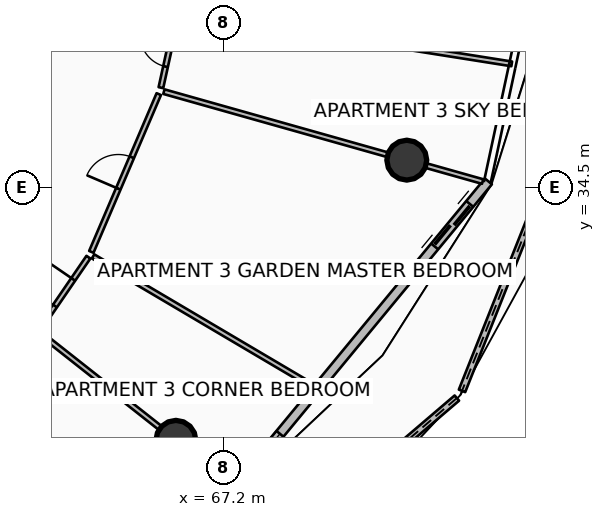
"""IFC4 building model, lengths in metres.
Left out: names, types, materials, properties, quantities, classifications, styles, units other than length and angle.
Written with IfcOpenShell. Run it as: python <this file> out.ifc"""

import sys

from ifc_helpers import new_model, si_unit, direction, frame, frame_2d, origin, origin_2d, place, context, subcontext, project, spatial, polyline, rectangle, circle, outline, extrude, element, fill, save


model = new_model("IFC4")
c1 = context("Model", 3, precision=1e-05, world=origin(), true_north=direction((0.0, 1.0)))
c2 = subcontext(c1, "Body", "Model", "MODEL_VIEW")
j1 = project(units=[si_unit("LENGTHUNIT", "METRE"), si_unit("PLANEANGLEUNIT", "RADIAN")], contexts=[c1])
p1 = place(None, origin())
s1 = spatial("IfcSite", under=j1, at=p1, CompositionType="ELEMENT")
p2 = place(p1, origin())
s2 = spatial("IfcBuilding", under=s1, at=p2, CompositionType="ELEMENT")
p3 = place(p2, frame((0.0, 0.0, 221.55)))
s3 = spatial("IfcBuildingStorey", under=s2, at=p3, CompositionType="ELEMENT", Elevation=221.55)
p4 = place(p3, frame((65.944, 27.854, 0.0), z_axis=(0.208518335243, -0.164359117207, 0.964109010672), x_axis=(0.619039399449, 0.785359931452, 0.0)))
e1 = element("IfcColumn", 1, at=p4, inside=s3, PredefinedType="COLUMN", context=c2, shape_type="SweptSolid", body=[
    extrude(circle(Radius=0.525, at=origin_2d()), origin(), (0.0, 0.0, 1.0), 3.599),
])
p5 = place(p3, frame((72.02, 35.226, 0.0), z_axis=(0.277251706749, -0.078156009679, 0.957613246178), x_axis=(0.271321276561, 0.962488838837, 0.0)))
e2 = element("IfcColumn", 2, at=p5, inside=s3, PredefinedType="COLUMN", context=c2, shape_type="SweptSolid", body=[
    extrude(circle(Radius=0.525, at=origin_2d()), origin(), (0.0, 0.0, 1.0), 3.624),
])
p6 = place(p3, frame((65.248, 22.053, 0.0), z_axis=(0.0, 0.0, 1.0), x_axis=(0.760227532438, 0.649656908624, 0.0)))
e3 = element("IfcWall", 3, at=p6, inside=s3, PredefinedType="PARAPET", context=c2, shape_type="SweptSolid", body=[
    extrude(outline(polyline([(0.0, 0.0), (10.64, 0.0), (10.64, 1.632), (5.32, 1.798), (0.0, 1.86), (0.0, 0.0)])), frame((0.0, 0.09, 0.0), z_axis=(0.0, -1.0, 0.0), x_axis=(1.0, 0.0, 0.0)), (0.0, 0.0, 1.0), 0.18),
])
p7 = place(p3, frame((73.473, 29.155, 0.0), z_axis=(0.0, 0.0, 1.0), x_axis=(0.369781756991, 0.929118642691, 0.0)))
e4 = element("IfcWall", 4, at=p7, inside=s3, PredefinedType="PARAPET", context=c2, shape_type="SweptSolid", body=[
    extrude(outline(polyline([(0.0, 0.0), (11.123, 0.0), (11.123, 1.233), (5.562, 1.418), (0.0, 1.632), (0.0, 0.0)])), frame((0.0, 0.09, 0.0), z_axis=(0.0, -1.0, 0.0), x_axis=(1.0, 0.0, 0.0)), (0.0, 0.0, 1.0), 0.18),
])
p8 = place(p3, frame((67.485, 26.576, 0.0), z_axis=(0.0, 0.0, 1.0), x_axis=(0.636759394418, 0.771062561418, 0.0)))
e5 = element("IfcWall", 5, at=p8, inside=s3, PredefinedType="SOLIDWALL", context=c2, shape_type="SweptSolid", body=[
    extrude(rectangle(XDim=10.494, YDim=0.24, at=frame_2d((5.247, 0.0))), origin(), (0.0, 0.0, 1.0), 2.42),
])
p9 = place(p8, frame((8.274, 0.0, 0.0)))
e6 = element("IfcOpeningElement", 6, at=p9, cuts=e5, PredefinedType="OPENING", context=c2, shape_type="SweptSolid", body=[
    extrude(rectangle(XDim=1.45, YDim=2.15, at=frame_2d((0.725, 1.075))), frame((0.0, 0.13, 0.0), z_axis=(0.0, -1.0, 0.0), x_axis=(1.0, 0.0, 0.0)), (0.0, 0.0, 1.0), 0.26),
])
p10 = place(p8, frame((0.28, 0.0, 0.65)))
e7 = element("IfcOpeningElement", 7, at=p10, cuts=e5, PredefinedType="OPENING", context=c2, shape_type="SweptSolid", body=[
    extrude(rectangle(XDim=1.6, YDim=1.5, at=frame_2d((0.8, 0.75))), frame((0.0, 0.13, 0.0), z_axis=(0.0, -1.0, 0.0), x_axis=(1.0, 0.0, 0.0)), (0.0, 0.0, 1.0), 0.26),
])
p11 = place(p3, frame((62.385, 30.66, 0.0), z_axis=(0.0, 0.0, 1.0), x_axis=(0.785323159094, -0.619086048777, 0.0)))
e8 = element("IfcWall", 8, at=p11, inside=s3, PredefinedType="PARTITIONING", context=c2, shape_type="SweptSolid", body=[
    extrude(rectangle(XDim=6.51, YDim=0.125, at=frame_2d((3.255, 0.0))), origin(), (0.0, 0.0, 1.0), 2.427),
])
p12 = place(p3, frame((63.765, 32.693, 0.0), z_axis=(0.0, 0.0, 1.0), x_axis=(0.861146221638, -0.508357339829, 0.0)))
e9 = element("IfcWall", 9, at=p12, inside=s3, PredefinedType="PARTITIONING", context=c2, shape_type="SweptSolid", body=[
    extrude(rectangle(XDim=6.723, YDim=0.125, at=frame_2d((3.362, 0.0))), origin(), (0.0, 0.0, 1.0), 2.445),
])
p13 = place(p3, frame((62.363, 30.804, 0.0), z_axis=(0.0, 0.0, 1.0), x_axis=(0.564981448435, 0.825103607388, 0.0)))
e10 = element("IfcWall", 10, at=p13, inside=s3, PredefinedType="PARTITIONING", context=c2, shape_type="SweptSolid", body=[
    extrude(rectangle(XDim=2.265, YDim=0.125, at=frame_2d((1.132, 0.0))), origin(), (0.0, 0.0, 1.0), 2.427),
])
p14 = place(p13, frame((0.708, 0.0, 0.0)))
e11 = element("IfcOpeningElement", 11, at=p14, cuts=e10, PredefinedType="OPENING", context=c2, shape_type="SweptSolid", body=[
    extrude(rectangle(XDim=0.85, YDim=2.06, at=frame_2d((0.425, 1.03))), frame((0.0, 0.073, 0.0), z_axis=(0.0, -1.0, 0.0), x_axis=(1.0, 0.0, 0.0)), (0.0, 0.0, 1.0), 0.145),
])
p15 = place(p3, frame((63.719, 32.813, 0.0), z_axis=(0.0, 0.0, 1.0), x_axis=(0.393135871469, 0.91948038944, 0.0)))
e12 = element("IfcWall", 12, at=p15, inside=s3, PredefinedType="PARTITIONING", context=c2, shape_type="SweptSolid", body=[
    extrude(rectangle(XDim=4.514, YDim=0.125, at=frame_2d((2.257, 0.0))), origin(), (0.0, 0.0, 1.0), 2.427),
])
p16 = place(p15, frame((1.807, 0.0, 0.0)))
e13 = element("IfcOpeningElement", 13, at=p16, cuts=e12, PredefinedType="OPENING", context=c2, shape_type="SweptSolid", body=[
    extrude(rectangle(XDim=0.9, YDim=2.08, at=frame_2d((0.45, 1.04))), frame((0.0, 0.073, 0.0), z_axis=(0.0, -1.0, 0.0), x_axis=(1.0, 0.0, 0.0)), (0.0, 0.0, 1.0), 0.145),
])
p17 = place(p3, frame((65.629, 37.028, 0.0), z_axis=(0.0, 0.0, 1.0), x_axis=(0.962453054575, -0.271448186105, 0.0)))
e14 = element("IfcWall", 14, at=p17, inside=s3, PredefinedType="PARTITIONING", context=c2, shape_type="SweptSolid", body=[
    extrude(rectangle(XDim=8.713, YDim=0.125, at=frame_2d((4.357, 0.0))), origin(), (0.0, 0.0, 1.0), 2.427),
])
p18 = place(p3, frame((66.082, 39.136, 0.0), z_axis=(0.0, 0.0, 1.0), x_axis=(0.987692071102, -0.156410909728, 0.0)))
e15 = element("IfcWall", 15, at=p18, inside=s3, PredefinedType="PARTITIONING", context=c2, shape_type="SweptSolid", body=[
    extrude(rectangle(XDim=8.808, YDim=0.125, at=frame_2d((4.404, 0.0))), origin(), (0.0, 0.0, 1.0), 2.445),
])
p19 = place(p3, frame((65.55, 37.133, 0.0), z_axis=(0.0, 0.0, 1.0), x_axis=(0.214390122188, 0.976748112621, 0.0)))
e16 = element("IfcWall", 16, at=p19, inside=s3, PredefinedType="PARTITIONING", context=c2, shape_type="SweptSolid", body=[
    extrude(rectangle(XDim=1.985, YDim=0.125, at=frame_2d((0.992, 0.0))), origin(), (0.0, 0.0, 1.0), 2.427),
])
p20 = place(p19, frame((0.567, 0.0, 0.0)))
e17 = element("IfcOpeningElement", 17, at=p20, cuts=e16, PredefinedType="OPENING", context=c2, shape_type="SweptSolid", body=[
    extrude(rectangle(XDim=0.85, YDim=2.06, at=frame_2d((0.425, 1.03))), frame((0.0, 0.073, 0.0), z_axis=(0.0, -1.0, 0.0), x_axis=(1.0, 0.0, 0.0)), (0.0, 0.0, 1.0), 0.145),
])
p21 = place(p9, origin())
e18 = element("IfcDoor", 18, at=p21, inside=s3, OperationType="DOUBLE_DOOR_SLIDING", PredefinedType="DOOR", context=c2, shape_type="SweptSolid", body=[
    extrude(rectangle(XDim=1.45, YDim=2.15, at=frame_2d((0.725, 1.075))), frame((0.0, 0.025, 0.0), z_axis=(0.0, -1.0, 0.0), x_axis=(1.0, 0.0, 0.0)), (0.0, 0.0, 1.0), 0.05),
])
fill(e6, e18)
p22 = place(p10, origin())
e19 = element("IfcWindow", 19, at=p22, inside=s3, PartitioningType="SINGLE_PANEL", PredefinedType="WINDOW", context=c2, shape_type="SweptSolid", body=[
    extrude(rectangle(XDim=1.6, YDim=1.5, at=frame_2d((0.8, 0.75))), frame((0.0, 0.03, 0.0), z_axis=(0.0, -1.0, 0.0), x_axis=(1.0, 0.0, 0.0)), (0.0, 0.0, 1.0), 0.06),
])
fill(e7, e19)
p23 = place(p14, origin())
e20 = element("IfcDoor", 20, at=p23, inside=s3, OperationType="SINGLE_SWING_RIGHT", PredefinedType="DOOR", context=c2, shape_type="SweptSolid", body=[
    extrude(rectangle(XDim=0.85, YDim=2.06, at=frame_2d((0.425, 1.03))), frame((0.0, 0.025, 0.0), z_axis=(0.0, -1.0, 0.0), x_axis=(1.0, 0.0, 0.0)), (0.0, 0.0, 1.0), 0.05),
])
fill(e11, e20)
p24 = place(p16, origin())
e21 = element("IfcDoor", 21, at=p24, inside=s3, OperationType="SINGLE_SWING_LEFT", PredefinedType="DOOR", context=c2, shape_type="SweptSolid", body=[
    extrude(rectangle(XDim=0.9, YDim=2.08, at=frame_2d((0.45, 1.04))), frame((0.0, 0.025, 0.0), z_axis=(0.0, -1.0, 0.0), x_axis=(1.0, 0.0, 0.0)), (0.0, 0.0, 1.0), 0.05),
])
fill(e13, e21)
p25 = place(p20, origin())
e22 = element("IfcDoor", 22, at=p25, inside=s3, OperationType="SINGLE_SWING_RIGHT", PredefinedType="DOOR", context=c2, shape_type="SweptSolid", body=[
    extrude(rectangle(XDim=0.85, YDim=2.06, at=frame_2d((0.425, 1.03))), frame((0.0, 0.025, 0.0), z_axis=(0.0, -1.0, 0.0), x_axis=(1.0, 0.0, 0.0)), (0.0, 0.0, 1.0), 0.05),
])
fill(e17, e22)
save(model, sys.argv[1])
